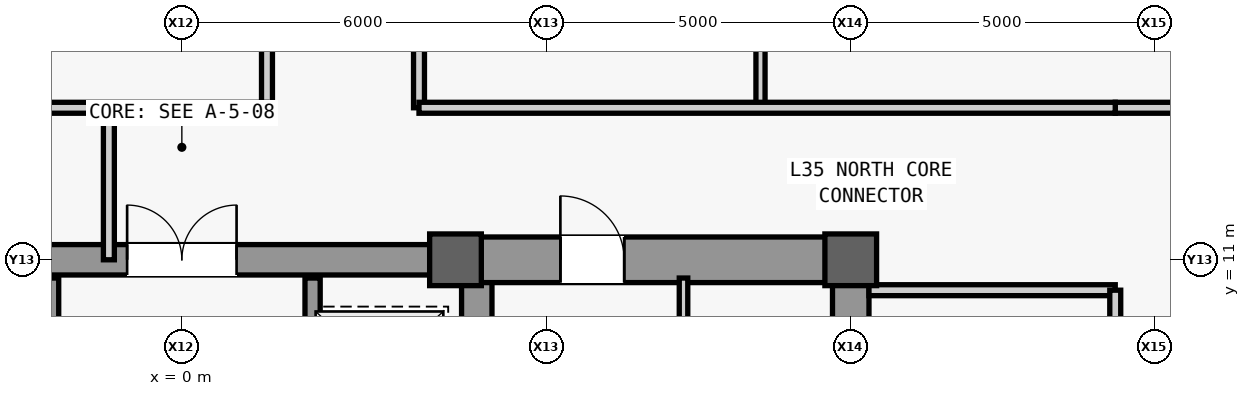
"""IFC4 building model, lengths in metres.
Left out: names, types, materials, properties, quantities, classifications, styles, units other than length and angle.
Written with IfcOpenShell. Run it as: python <this file> out.ifc"""

import sys

from ifc_helpers import new_model, si_unit, direction, frame, frame_2d, origin, origin_2d, place, context, subcontext, project, spatial, rectangle, extrude, source, transform, mapped, element, fill, save


model = new_model("IFC4")
c1 = context("Model", 3, precision=1e-05, world=origin(), true_north=direction((0.0, 1.0)))
c2 = subcontext(c1, "Body", "Model", "MODEL_VIEW")
j1 = project(units=[si_unit("LENGTHUNIT", "METRE"), si_unit("PLANEANGLEUNIT", "RADIAN")], contexts=[c1])
p1 = place(None, origin())
s1 = spatial("IfcSite", under=j1, at=p1, CompositionType="ELEMENT")
p2 = place(p1, origin())
s2 = spatial("IfcBuilding", under=s1, at=p2, CompositionType="ELEMENT")
p3 = place(p2, frame((0.0, 0.0, 155.1)))
s3 = spatial("IfcBuildingStorey", under=s2, at=p3, CompositionType="ELEMENT", Elevation=155.1)
m1 = source(origin(), c2, "Body", "SweptSolid", [
    extrude(rectangle(XDim=22.0, YDim=0.6, at=frame_2d((11.0, 0.0))), origin(), (0.0, 0.0, 1.0), 3.78),
])
p4 = place(p3, frame((11.0, -11.0, 0.0), z_axis=(0.0, 0.0, 1.0), x_axis=(0.0, 1.0, 0.0)))
e1 = element("IfcWall", 1, at=p4, inside=s3, PredefinedType="SHEAR", context=c2, shape_type="MappedRepresentation", body=[
    mapped(m1, transform((0.0, 0.0, 0.0), scale=1.0)),
])
m2 = source(origin(), c2, "Body", "SweptSolid", [
    extrude(rectangle(XDim=1.1, YDim=2.2, at=frame_2d((0.55, 1.1))), frame((0.0, 0.31, 0.0), z_axis=(0.0, -1.0, 0.0), x_axis=(1.0, 0.0, 0.0)), (0.0, 0.0, 1.0), 0.62),
])
p5 = place(p4, frame((0.8, 0.0, 0.0)))
e2 = element("IfcOpeningElement", 2, at=p5, cuts=e1, PredefinedType="OPENING", context=c2, shape_type="MappedRepresentation", body=[
    mapped(m2, transform((0.0, 0.0, 0.0), scale=1.0)),
])
m3 = source(origin(), c2, "Body", "SweptSolid", [
    extrude(rectangle(XDim=0.9, YDim=2.15, at=frame_2d((0.45, 1.075))), frame((0.0, 0.31, 0.0), z_axis=(0.0, -1.0, 0.0), x_axis=(1.0, 0.0, 0.0)), (0.0, 0.0, 1.0), 0.62),
])
p6 = place(p4, frame((6.2, 0.0, 0.0)))
e3 = element("IfcOpeningElement", 3, at=p6, cuts=e1, PredefinedType="OPENING", context=c2, shape_type="MappedRepresentation", body=[
    mapped(m3, transform((0.0, 0.0, 0.0), scale=1.0)),
])
p7 = place(p4, frame((8.525, 0.0, 0.0)))
e4 = element("IfcOpeningElement", 4, at=p7, cuts=e1, PredefinedType="OPENING", context=c2, shape_type="MappedRepresentation", body=[
    mapped(m3, transform((0.0, 0.0, 0.0), scale=1.0)),
])
m4 = source(origin(), c2, "Body", "SweptSolid", [
    extrude(rectangle(XDim=1.3, YDim=2.3, at=frame_2d((0.65, 1.15))), frame((0.0, 0.31, 0.0), z_axis=(0.0, -1.0, 0.0), x_axis=(1.0, 0.0, 0.0)), (0.0, 0.0, 1.0), 0.62),
])
p8 = place(p4, frame((2.7, 0.0, 0.0)))
e5 = element("IfcOpeningElement", 5, at=p8, cuts=e1, PredefinedType="OPENING", context=c2, shape_type="MappedRepresentation", body=[
    mapped(m4, transform((0.0, 0.0, 0.0), scale=1.0)),
])
p9 = place(p4, frame((13.35, 0.0, 0.0)))
e6 = element("IfcOpeningElement", 6, at=p9, cuts=e1, PredefinedType="OPENING", context=c2, shape_type="MappedRepresentation", body=[
    mapped(m4, transform((0.0, 0.0, 0.0), scale=1.0)),
])
m5 = source(origin(), c2, "Body", "SweptSolid", [
    extrude(rectangle(XDim=21.4, YDim=0.5, at=frame_2d((10.7, 0.0))), origin(), (0.0, 0.0, 1.0), 3.78),
])
p10 = place(p3, frame((4.85, -10.7, 0.0), z_axis=(0.0, 0.0, 1.0), x_axis=(0.0, 1.0, 0.0)))
e7 = element("IfcWall", 7, at=p10, inside=s3, PredefinedType="SHEAR", context=c2, shape_type="MappedRepresentation", body=[
    mapped(m5, transform((0.0, 0.0, 0.0), scale=1.0)),
])
m6 = source(origin(), c2, "Body", "SweptSolid", [
    extrude(rectangle(XDim=5.85, YDim=0.75, at=frame_2d((2.925, 0.0))), origin(), (0.0, 0.0, 1.0), 3.78),
])
p11 = place(p3, frame((4.85, 11.0, 0.0), z_axis=(0.0, 0.0, 1.0), x_axis=(1.0, 0.0, 0.0)))
e8 = element("IfcWall", 8, at=p11, inside=s3, PredefinedType="SHEAR", context=c2, shape_type="MappedRepresentation", body=[
    mapped(m6, transform((0.0, 0.0, 0.0), scale=1.0)),
])
m7 = source(origin(), c2, "Body", "SweptSolid", [
    extrude(rectangle(XDim=1.05, YDim=2.2, at=frame_2d((0.525, 1.1))), frame((0.0, 0.385, 0.0), z_axis=(0.0, -1.0, 0.0), x_axis=(1.0, 0.0, 0.0)), (0.0, 0.0, 1.0), 0.77),
])
p12 = place(p11, frame((1.375, 0.0, 0.0)))
e9 = element("IfcOpeningElement", 9, at=p12, cuts=e8, PredefinedType="OPENING", context=c2, shape_type="MappedRepresentation", body=[
    mapped(m7, transform((0.0, 0.0, 0.0), scale=1.0)),
])
m8 = source(origin(), c2, "Body", "SweptSolid", [
    extrude(rectangle(XDim=9.2, YDim=0.5, at=frame_2d((4.6, 0.0))), origin(), (0.0, 0.0, 1.0), 3.78),
])
p13 = place(p3, frame((-4.6, 11.0, 0.0), z_axis=(0.0, 0.0, 1.0), x_axis=(1.0, 0.0, 0.0)))
e10 = element("IfcWall", 10, at=p13, inside=s3, PredefinedType="SHEAR", context=c2, shape_type="MappedRepresentation", body=[
    mapped(m8, transform((0.0, 0.0, 0.0), scale=1.0)),
])
m9 = source(origin(), c2, "Body", "SweptSolid", [
    extrude(rectangle(XDim=1.8, YDim=2.25, at=frame_2d((0.9, 1.125))), frame((0.0, 0.26, 0.0), z_axis=(0.0, -1.0, 0.0), x_axis=(1.0, 0.0, 0.0)), (0.0, 0.0, 1.0), 0.52),
])
p14 = place(p13, frame((3.7, 0.0, 0.0)))
e11 = element("IfcOpeningElement", 11, at=p14, cuts=e10, PredefinedType="OPENING", context=c2, shape_type="MappedRepresentation", body=[
    mapped(m9, transform((0.0, 0.0, 0.0), scale=1.0)),
])
m10 = source(origin(), c2, "Body", "SweptSolid", [
    extrude(rectangle(XDim=0.85, YDim=0.85, at=origin_2d()), origin(), (0.0, 0.0, 1.0), 4.0),
])
for number, where, z_axis, x_axis in (
    (12, (4.5, 11.0, 0.0), (0.0, 0.0, 1.0), (1.0, 0.0, 0.0)),
    (13, (11.0, 11.0, 0.0), (0.0, 0.0, 1.0), (1.0, 0.0, 0.0)),
):
    element("IfcColumn", number, at=place(p3, frame(where, z_axis=z_axis, x_axis=x_axis)), inside=s3, PredefinedType="COLUMN", context=c2, shape_type="MappedRepresentation", body=[
        mapped(m10, transform((0.0, 0.0, 0.0), scale=1.0)),
    ])
m11 = source(origin(), c2, "Body", "SweptSolid", [
    extrude(rectangle(XDim=9.4, YDim=0.14, at=frame_2d((4.7, 0.0))), origin(), (0.0, 0.0, 1.0), 3.78),
])
p15 = place(p3, frame((8.25, 1.3, 0.0), z_axis=(0.0, 0.0, 1.0), x_axis=(0.0, 1.0, 0.0)))
e14 = element("IfcWall", 14, at=p15, inside=s3, PredefinedType="PARTITIONING", context=c2, shape_type="MappedRepresentation", body=[
    mapped(m11, transform((0.0, 0.0, 0.0), scale=1.0)),
])
m12 = source(origin(), c2, "Body", "SweptSolid", [
    extrude(rectangle(XDim=4.05, YDim=0.18, at=frame_2d((2.025, 0.0))), origin(), (0.0, 0.0, 1.0), 3.78),
])
p16 = place(p3, frame((11.3, 10.5, 0.0), z_axis=(0.0, 0.0, 1.0), x_axis=(1.0, 0.0, 0.0)))
e15 = element("IfcWall", 15, at=p16, inside=s3, PredefinedType="PARTITIONING", context=c2, shape_type="MappedRepresentation", body=[
    mapped(m12, transform((0.0, 0.0, 0.0), scale=1.0)),
])
m13 = source(origin(), c2, "Body", "SweptSolid", [
    extrude(rectangle(XDim=16.6, YDim=0.18, at=frame_2d((8.3, 0.0))), origin(), (0.0, 0.0, 1.0), 3.78),
])
p17 = place(p3, frame((15.35, -6.1, 0.0), z_axis=(0.0, 0.0, 1.0), x_axis=(0.0, 1.0, 0.0)))
e16 = element("IfcWall", 16, at=p17, inside=s3, PredefinedType="PARTITIONING", context=c2, shape_type="MappedRepresentation", body=[
    mapped(m13, transform((0.0, 0.0, 0.0), scale=1.0)),
])
m14 = source(origin(), c2, "Body", "SweptSolid", [
    extrude(rectangle(XDim=1.8, YDim=2.25, at=frame_2d((0.9, 1.125))), frame((0.0, 0.1, 0.0), z_axis=(0.0, -1.0, 0.0), x_axis=(1.0, 0.0, 0.0)), (0.0, 0.0, 1.0), 0.2),
])
p18 = place(p17, frame((2.7, 0.0, 0.0)))
e17 = element("IfcOpeningElement", 17, at=p18, cuts=e16, PredefinedType="OPENING", context=c2, shape_type="MappedRepresentation", body=[
    mapped(m14, transform((0.0, 0.0, 0.0), scale=1.0)),
])
p19 = place(p17, frame((13.0, 0.0, 0.0)))
e18 = element("IfcOpeningElement", 18, at=p19, cuts=e16, PredefinedType="OPENING", context=c2, shape_type="MappedRepresentation", body=[
    mapped(m14, transform((0.0, 0.0, 0.0), scale=1.0)),
])
m15 = source(origin(), c2, "Body", "SweptSolid", [
    extrude(rectangle(XDim=5.4, YDim=0.25, at=frame_2d((2.7, 0.0))), origin(), (0.0, 0.0, 1.0), 3.78),
])
p20 = place(p3, frame((-2.15, 5.3, 0.0), z_axis=(0.0, 0.0, 1.0), x_axis=(0.0, 1.0, 0.0)))
e19 = element("IfcWall", 19, at=p20, inside=s3, PredefinedType="SHEAR", context=c2, shape_type="MappedRepresentation", body=[
    mapped(m15, transform((0.0, 0.0, 0.0), scale=1.0)),
])
m16 = source(origin(), c2, "Body", "SweptSolid", [
    extrude(rectangle(XDim=1.2, YDim=2.3, at=frame_2d((0.6, 1.15))), frame((0.0, 0.135, 0.0), z_axis=(0.0, -1.0, 0.0), x_axis=(1.0, 0.0, 0.0)), (0.0, 0.0, 1.0), 0.27),
])
p21 = place(p20, frame((3.3, 0.0, 0.0)))
e20 = element("IfcOpeningElement", 20, at=p21, cuts=e19, PredefinedType="OPENING", context=c2, shape_type="MappedRepresentation", body=[
    mapped(m16, transform((0.0, 0.0, 0.0), scale=1.0)),
])
p22 = place(p20, frame((0.9, 0.0, 0.0)))
e21 = element("IfcOpeningElement", 21, at=p22, cuts=e19, PredefinedType="OPENING", context=c2, shape_type="MappedRepresentation", body=[
    mapped(m16, transform((0.0, 0.0, 0.0), scale=1.0)),
])
p23 = place(p3, frame((2.15, 5.3, 0.0), z_axis=(0.0, 0.0, 1.0), x_axis=(0.0, 1.0, 0.0)))
e22 = element("IfcWall", 22, at=p23, inside=s3, PredefinedType="SHEAR", context=c2, shape_type="MappedRepresentation", body=[
    mapped(m15, transform((0.0, 0.0, 0.0), scale=1.0)),
])
p24 = place(p23, frame((3.3, 0.0, 0.0)))
e23 = element("IfcOpeningElement", 23, at=p24, cuts=e22, PredefinedType="OPENING", context=c2, shape_type="MappedRepresentation", body=[
    mapped(m16, transform((0.0, 0.0, 0.0), scale=1.0)),
])
p25 = place(p23, frame((0.9, 0.0, 0.0)))
e24 = element("IfcOpeningElement", 24, at=p25, cuts=e22, PredefinedType="OPENING", context=c2, shape_type="MappedRepresentation", body=[
    mapped(m16, transform((0.0, 0.0, 0.0), scale=1.0)),
])
m17 = source(origin(), c2, "Body", "SweptSolid", [
    extrude(rectangle(XDim=2.45, YDim=0.18, at=frame_2d((1.225, 0.0))), origin(), (0.0, 0.0, 1.0), 3.78),
])
p26 = place(p3, frame((15.35, 13.5, 0.0), z_axis=(0.0, 0.0, 1.0), x_axis=(1.0, 0.0, 0.0)))
e25 = element("IfcWall", 25, at=p26, inside=s3, PredefinedType="PARTITIONING", context=c2, shape_type="MappedRepresentation", body=[
    mapped(m17, transform((0.0, 0.0, 0.0), scale=1.0)),
])
m18 = source(origin(), c2, "Body", "SweptSolid", [
    extrude(rectangle(XDim=2.5, YDim=0.18, at=frame_2d((1.25, 0.0))), origin(), (0.0, 0.0, 1.0), 3.78),
])
p27 = place(p3, frame((-1.2, 11.0, 0.0), z_axis=(0.0, 0.0, 1.0), x_axis=(0.0, 1.0, 0.0)))
e26 = element("IfcWall", 26, at=p27, inside=s3, PredefinedType="PARTITIONING", context=c2, shape_type="MappedRepresentation", body=[
    mapped(m18, transform((0.0, 0.0, 0.0), scale=1.0)),
])
m19 = source(origin(), c2, "Body", "SweptSolid", [
    extrude(rectangle(XDim=16.5, YDim=0.18, at=frame_2d((8.25, 0.0))), origin(), (0.0, 0.0, 1.0), 3.78),
])
p28 = place(p3, frame((1.4, 13.5, 0.0), z_axis=(0.0, 0.0, 1.0), x_axis=(0.0, 1.0, 0.0)))
e27 = element("IfcWall", 27, at=p28, inside=s3, PredefinedType="PARTITIONING", context=c2, shape_type="MappedRepresentation", body=[
    mapped(m19, transform((0.0, 0.0, 0.0), scale=1.0)),
])
m20 = source(origin(), c2, "Body", "SweptSolid", [
    extrude(rectangle(XDim=1.05, YDim=2.2, at=frame_2d((0.525, 1.1))), frame((0.0, 0.1, 0.0), z_axis=(0.0, -1.0, 0.0), x_axis=(1.0, 0.0, 0.0)), (0.0, 0.0, 1.0), 0.2),
])
p29 = place(p28, frame((11.85, 0.0, 0.0)))
e28 = element("IfcOpeningElement", 28, at=p29, cuts=e27, PredefinedType="OPENING", context=c2, shape_type="MappedRepresentation", body=[
    mapped(m20, transform((0.0, 0.0, 0.0), scale=1.0)),
])
m21 = source(origin(), c2, "Body", "SweptSolid", [
    extrude(rectangle(XDim=16.75, YDim=0.18, at=frame_2d((8.375, 0.0))), origin(), (0.0, 0.0, 1.0), 3.78),
])
p30 = place(p3, frame((-15.35, 13.5, 0.0), z_axis=(0.0, 0.0, 1.0), x_axis=(1.0, 0.0, 0.0)))
e29 = element("IfcWall", 29, at=p30, inside=s3, PredefinedType="PARTITIONING", context=c2, shape_type="MappedRepresentation", body=[
    mapped(m21, transform((0.0, 0.0, 0.0), scale=1.0)),
])
m22 = source(origin(), c2, "Body", "SweptSolid", [
    extrude(rectangle(XDim=16.5, YDim=0.15, at=frame_2d((8.25, 0.0))), origin(), (0.0, 0.0, 1.0), 3.78),
])
p31 = place(p3, frame((9.516, 13.5, 0.0), z_axis=(0.0, 0.0, 1.0), x_axis=(0.0, 1.0, 0.0)))
e30 = element("IfcWall", 30, at=p31, inside=s3, PredefinedType="PARTITIONING", context=c2, shape_type="MappedRepresentation", body=[
    mapped(m22, transform((0.0, 0.0, 0.0), scale=1.0)),
])
m23 = source(origin(), c2, "Body", "SweptSolid", [
    extrude(rectangle(XDim=0.95, YDim=2.15, at=frame_2d((0.475, 1.075))), frame((0.0, 0.085, 0.0), z_axis=(0.0, -1.0, 0.0), x_axis=(1.0, 0.0, 0.0)), (0.0, 0.0, 1.0), 0.17),
])
p32 = place(p31, frame((11.9, 0.0, 0.0)))
e31 = element("IfcOpeningElement", 31, at=p32, cuts=e30, PredefinedType="OPENING", context=c2, shape_type="MappedRepresentation", body=[
    mapped(m23, transform((0.0, 0.0, 0.0), scale=1.0)),
])
p33 = place(p3, frame((3.9, 13.5, 0.0), z_axis=(0.0, 0.0, 1.0), x_axis=(0.0, 1.0, 0.0)))
e32 = element("IfcWall", 32, at=p33, inside=s3, PredefinedType="PARTITIONING", context=c2, shape_type="MappedRepresentation", body=[
    mapped(m19, transform((0.0, 0.0, 0.0), scale=1.0)),
])
p34 = place(p33, frame((11.85, 0.0, 0.0)))
e33 = element("IfcOpeningElement", 33, at=p34, cuts=e32, PredefinedType="OPENING", context=c2, shape_type="MappedRepresentation", body=[
    mapped(m20, transform((0.0, 0.0, 0.0), scale=1.0)),
])
m24 = source(origin(), c2, "Body", "SweptSolid", [
    extrude(rectangle(XDim=11.45, YDim=0.18, at=frame_2d((5.725, 0.0))), origin(), (0.0, 0.0, 1.0), 3.78),
])
p35 = place(p3, frame((3.9, 13.5, 0.0), z_axis=(0.0, 0.0, 1.0), x_axis=(1.0, 0.0, 0.0)))
e34 = element("IfcWall", 34, at=p35, inside=s3, PredefinedType="PARTITIONING", context=c2, shape_type="MappedRepresentation", body=[
    mapped(m24, transform((0.0, 0.0, 0.0), scale=1.0)),
])
m25 = source(origin(), c2, "Body", "SweptSolid", [
    extrude(rectangle(XDim=1.05, YDim=2.2, at=frame_2d((0.525, 1.1))), frame((0.0, 0.025, 0.0), z_axis=(0.0, -1.0, 0.0), x_axis=(1.0, 0.0, 0.0)), (0.0, 0.0, 1.0), 0.05),
])
p36 = place(p12, origin())
e35 = element("IfcDoor", 35, at=p36, inside=s3, OperationType="SINGLE_SWING_LEFT", PredefinedType="DOOR", context=c2, shape_type="MappedRepresentation", body=[
    mapped(m25, transform((0.0, 0.0, 0.0), scale=1.0)),
])
fill(e9, e35)
m26 = source(origin(), c2, "Body", "SweptSolid", [
    extrude(rectangle(XDim=1.8, YDim=2.25, at=frame_2d((0.9, 1.125))), frame((0.0, 0.025, 0.0), z_axis=(0.0, -1.0, 0.0), x_axis=(1.0, 0.0, 0.0)), (0.0, 0.0, 1.0), 0.05),
])
p37 = place(p14, origin())
e36 = element("IfcDoor", 36, at=p37, inside=s3, OperationType="SINGLE_SWING_RIGHT", PredefinedType="DOOR", context=c2, shape_type="MappedRepresentation", body=[
    mapped(m26, transform((0.0, 0.0, 0.0), scale=1.0)),
])
fill(e11, e36)
save(model, sys.argv[1])
